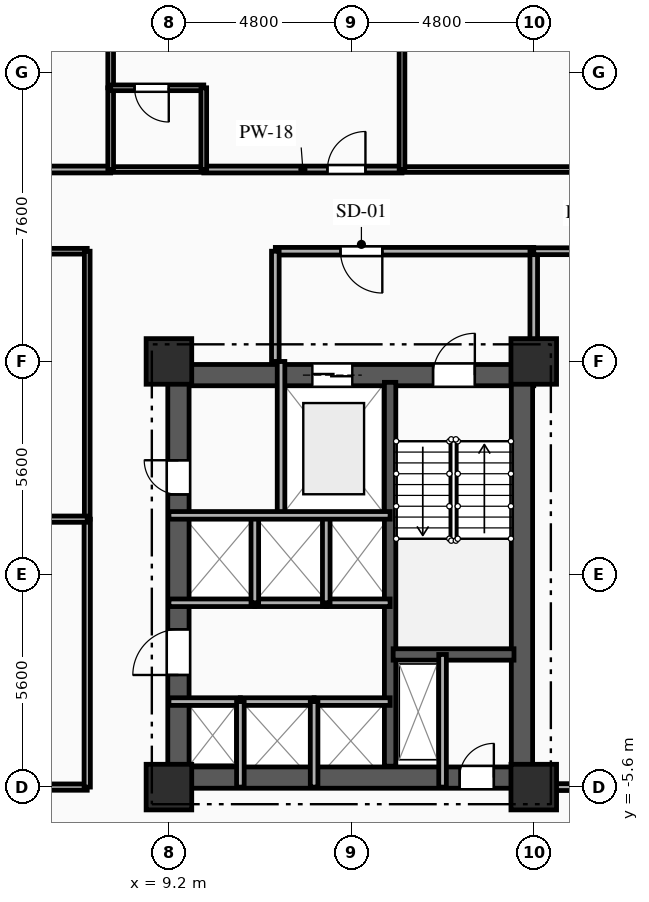
"""IFC4 building model, lengths in metres.
Left out: names, types, materials, properties, quantities, classifications, styles, units other than length and angle.
Written with IfcOpenShell. Run it as: python <this file> out.ifc"""

import sys

from ifc_helpers import new_model, si_unit, direction, frame, frame_2d, origin, origin_2d, place, context, subcontext, project, spatial, rectangle, extrude, element, fill, save


model = new_model("IFC4")
c1 = context("Model", 3, precision=1e-05, world=origin(), true_north=direction((0.0, 1.0)))
c2 = subcontext(c1, "Body", "Model", "MODEL_VIEW")
j1 = project(units=[si_unit("LENGTHUNIT", "METRE"), si_unit("PLANEANGLEUNIT", "RADIAN")], contexts=[c1])
p1 = place(None, origin())
s1 = spatial("IfcSite", under=j1, at=p1, CompositionType="ELEMENT")
p2 = place(p1, origin())
s2 = spatial("IfcBuilding", under=s1, at=p2, CompositionType="ELEMENT")
p3 = place(p2, frame((0.0, 0.0, 43.75)))
s3 = spatial("IfcBuildingStorey", under=s2, at=p3, CompositionType="ELEMENT", Elevation=43.75)
for number, where, z_axis, x_axis in (
    (1, (9.2, -5.6, 0.0), (0.0, 0.0, 1.0), (1.0, 0.0, 0.0)),
    (2, (9.2, 5.6, 0.0), (0.0, 0.0, 1.0), (1.0, 0.0, 0.0)),
    (3, (18.8, -5.6, 0.0), (0.0, 0.0, 1.0), (1.0, 0.0, 0.0)),
    (4, (18.8, 5.6, 0.0), (0.0, 0.0, 1.0), (1.0, 0.0, 0.0)),
):
    element("IfcColumn", number, at=place(p3, frame(where, z_axis=z_axis, x_axis=x_axis)), inside=s3, PredefinedType="COLUMN", context=c2, shape_type="SweptSolid", body=[
        extrude(rectangle(XDim=1.2, YDim=1.2, at=origin_2d()), origin(), (0.0, 0.0, 1.0), 3.35),
    ])
p4 = place(p3, frame((9.2, 5.24, 0.0), z_axis=(0.0, 0.0, 1.0), x_axis=(1.0, 0.0, 0.0)))
e5 = element("IfcWall", 5, at=p4, inside=s3, PredefinedType="SHEAR", context=c2, shape_type="SweptSolid", body=[
    extrude(rectangle(XDim=9.6, YDim=0.56, at=frame_2d((4.8, 0.0))), origin(), (0.0, 0.0, 1.0), 3.035),
])
p5 = place(p4, frame((6.95, 0.0, 0.0)))
e6 = element("IfcOpeningElement", 6, at=p5, cuts=e5, PredefinedType="OPENING", context=c2, shape_type="SweptSolid", body=[
    extrude(rectangle(XDim=1.1, YDim=2.15, at=frame_2d((0.55, 1.075))), frame((0.0, 0.29, 0.0), z_axis=(0.0, -1.0, 0.0), x_axis=(1.0, 0.0, 0.0)), (0.0, 0.0, 1.0), 0.58),
])
p6 = place(p4, frame((3.775, 0.0, 0.0)))
e7 = element("IfcOpeningElement", 7, at=p6, cuts=e5, PredefinedType="OPENING", context=c2, shape_type="SweptSolid", body=[
    extrude(rectangle(XDim=1.05, YDim=2.1, at=frame_2d((0.525, 1.05))), frame((0.0, 0.29, 0.0), z_axis=(0.0, -1.0, 0.0), x_axis=(1.0, 0.0, 0.0)), (0.0, 0.0, 1.0), 0.58),
])
p7 = place(p3, frame((9.2, -5.35, 0.0), z_axis=(0.0, 0.0, 1.0), x_axis=(1.0, 0.0, 0.0)))
e8 = element("IfcWall", 8, at=p7, inside=s3, PredefinedType="SHEAR", context=c2, shape_type="SweptSolid", body=[
    extrude(rectangle(XDim=9.6, YDim=0.56, at=frame_2d((4.8, 0.0))), origin(), (0.0, 0.0, 1.0), 3.035),
])
p8 = place(p7, frame((7.65, 0.0, 0.0)))
e9 = element("IfcOpeningElement", 9, at=p8, cuts=e8, PredefinedType="OPENING", context=c2, shape_type="SweptSolid", body=[
    extrude(rectangle(XDim=0.9, YDim=2.1, at=frame_2d((0.45, 1.05))), frame((0.0, 0.29, 0.0), z_axis=(0.0, -1.0, 0.0), x_axis=(1.0, 0.0, 0.0)), (0.0, 0.0, 1.0), 0.58),
])
p9 = place(p3, frame((9.45, -5.05, 0.0), z_axis=(0.0, 0.0, 1.0), x_axis=(0.0, 1.0, 0.0)))
e10 = element("IfcWall", 10, at=p9, inside=s3, PredefinedType="SHEAR", context=c2, shape_type="SweptSolid", body=[
    extrude(rectangle(XDim=10.1, YDim=0.56, at=frame_2d((5.05, 0.0))), origin(), (0.0, 0.0, 1.0), 3.035),
])
p10 = place(p9, frame((7.15, 0.0, 0.0)))
e11 = element("IfcOpeningElement", 11, at=p10, cuts=e10, PredefinedType="OPENING", context=c2, shape_type="SweptSolid", body=[
    extrude(rectangle(XDim=0.9, YDim=2.1, at=frame_2d((0.45, 1.05))), frame((0.0, 0.29, 0.0), z_axis=(0.0, -1.0, 0.0), x_axis=(1.0, 0.0, 0.0)), (0.0, 0.0, 1.0), 0.58),
])
p11 = place(p9, frame((2.4, 0.0, 0.0)))
e12 = element("IfcOpeningElement", 12, at=p11, cuts=e10, PredefinedType="OPENING", context=c2, shape_type="SweptSolid", body=[
    extrude(rectangle(XDim=1.2, YDim=2.15, at=frame_2d((0.6, 1.075))), frame((0.0, 0.29, 0.0), z_axis=(0.0, -1.0, 0.0), x_axis=(1.0, 0.0, 0.0)), (0.0, 0.0, 1.0), 0.58),
])
p12 = place(p3, frame((18.49, -5.05, 0.0), z_axis=(0.0, 0.0, 1.0), x_axis=(0.0, 1.0, 0.0)))
e13 = element("IfcWall", 13, at=p12, inside=s3, PredefinedType="SHEAR", context=c2, shape_type="SweptSolid", body=[
    extrude(rectangle(XDim=10.1, YDim=0.56, at=frame_2d((5.05, 0.0))), origin(), (0.0, 0.0, 1.0), 3.035),
])
p13 = place(p3, frame((15.02, -5.05, 0.0), z_axis=(0.0, 0.0, 1.0), x_axis=(0.0, 1.0, 0.0)))
e14 = element("IfcWall", 14, at=p13, inside=s3, PredefinedType="SHEAR", context=c2, shape_type="SweptSolid", body=[
    extrude(rectangle(XDim=10.1, YDim=0.3, at=frame_2d((5.05, 0.0))), origin(), (0.0, 0.0, 1.0), 3.035),
])
p14 = place(p3, frame((15.1, -2.11, 0.0), z_axis=(0.0, 0.0, 1.0), x_axis=(1.0, 0.0, 0.0)))
e15 = element("IfcWall", 15, at=p14, inside=s3, PredefinedType="SHEAR", context=c2, shape_type="SweptSolid", body=[
    extrude(rectangle(XDim=3.18, YDim=0.3, at=frame_2d((1.59, 0.0))), origin(), (0.0, 0.0, 1.0), 3.035),
])
p15 = place(p3, frame((16.4, -2.11, 0.0), z_axis=(0.0, 0.0, 1.0), x_axis=(0.0, -1.0, 0.0)))
e16 = element("IfcWall", 16, at=p15, inside=s3, PredefinedType="PARTITIONING", context=c2, shape_type="SweptSolid", body=[
    extrude(rectangle(XDim=3.49, YDim=0.2, at=frame_2d((1.745, 0.0))), origin(), (0.0, 0.0, 1.0), 3.035),
])
p16 = place(p3, frame((12.15, 5.6, 0.0), z_axis=(0.0, 0.0, 1.0), x_axis=(0.0, -1.0, 0.0)))
e17 = element("IfcWall", 17, at=p16, inside=s3, PredefinedType="PARTITIONING", context=c2, shape_type="SweptSolid", body=[
    extrude(rectangle(XDim=4.05, YDim=0.2, at=frame_2d((2.025, 0.0))), origin(), (0.0, 0.0, 1.0), 3.035),
])
p17 = place(p3, frame((18.8, 8.5, 0.0), z_axis=(0.0, 0.0, 1.0), x_axis=(-1.0, 0.0, 0.0)))
e18 = element("IfcWall", 18, at=p17, inside=s3, PredefinedType="PARTITIONING", context=c2, shape_type="SweptSolid", body=[
    extrude(rectangle(XDim=6.8, YDim=0.2, at=frame_2d((3.4, 0.0))), origin(), (0.0, 0.0, 1.0), 3.035),
])
p18 = place(p17, frame((3.985, 0.0, 0.0)))
e19 = element("IfcOpeningElement", 19, at=p18, cuts=e18, PredefinedType="OPENING", context=c2, shape_type="SweptSolid", body=[
    extrude(rectangle(XDim=1.1, YDim=2.15, at=frame_2d((0.55, 1.075))), frame((0.0, 0.11, 0.0), z_axis=(0.0, -1.0, 0.0), x_axis=(1.0, 0.0, 0.0)), (0.0, 0.0, 1.0), 0.22),
])
p19 = place(p3, frame((12.0, 8.5, 0.0), z_axis=(0.0, 0.0, 1.0), x_axis=(0.0, -1.0, 0.0)))
e20 = element("IfcWall", 20, at=p19, inside=s3, PredefinedType="PARTITIONING", context=c2, shape_type="SweptSolid", body=[
    extrude(rectangle(XDim=2.9, YDim=0.2, at=frame_2d((1.45, 0.0))), origin(), (0.0, 0.0, 1.0), 3.035),
])
p20 = place(p3, frame((18.8, 5.6, 0.0), z_axis=(0.0, 0.0, 1.0), x_axis=(0.0, 1.0, 0.0)))
e21 = element("IfcWall", 21, at=p20, inside=s3, PredefinedType="PARTITIONING", context=c2, shape_type="SweptSolid", body=[
    extrude(rectangle(XDim=2.9, YDim=0.2, at=frame_2d((1.45, 0.0))), origin(), (0.0, 0.0, 1.0), 2.52),
])
p21 = place(p3, frame((9.2, -3.35, 0.0), z_axis=(0.0, 0.0, 1.0), x_axis=(1.0, 0.0, 0.0)))
e22 = element("IfcWall", 22, at=p21, inside=s3, PredefinedType="PARTITIONING", context=c2, shape_type="SweptSolid", body=[
    extrude(rectangle(XDim=1.88, YDim=0.2, at=frame_2d((0.94, 0.0))), origin(), (0.0, 0.0, 1.0), 2.75),
])
p22 = place(p3, frame((11.08, -3.35, 0.0), z_axis=(0.0, 0.0, 1.0), x_axis=(1.0, 0.0, 0.0)))
e23 = element("IfcWall", 23, at=p22, inside=s3, PredefinedType="PARTITIONING", context=c2, shape_type="SweptSolid", body=[
    extrude(rectangle(XDim=1.94, YDim=0.2, at=frame_2d((0.97, 0.0))), origin(), (0.0, 0.0, 1.0), 3.035),
])
p23 = place(p3, frame((13.02, -3.35, 0.0), z_axis=(0.0, 0.0, 1.0), x_axis=(1.0, 0.0, 0.0)))
e24 = element("IfcWall", 24, at=p23, inside=s3, PredefinedType="PARTITIONING", context=c2, shape_type="SweptSolid", body=[
    extrude(rectangle(XDim=2.0, YDim=0.2, at=frame_2d((1.0, 0.0))), origin(), (0.0, 0.0, 1.0), 3.035),
])
p24 = place(p3, frame((11.46, -0.75, 0.0), z_axis=(0.0, 0.0, 1.0), x_axis=(-1.0, 0.0, 0.0)))
e25 = element("IfcWall", 25, at=p24, inside=s3, PredefinedType="PARTITIONING", context=c2, shape_type="SweptSolid", body=[
    extrude(rectangle(XDim=2.26, YDim=0.2, at=frame_2d((1.13, 0.0))), origin(), (0.0, 0.0, 1.0), 3.035),
])
p25 = place(p3, frame((13.34, -0.75, 0.0), z_axis=(0.0, 0.0, 1.0), x_axis=(-1.0, 0.0, 0.0)))
e26 = element("IfcWall", 26, at=p25, inside=s3, PredefinedType="PARTITIONING", context=c2, shape_type="SweptSolid", body=[
    extrude(rectangle(XDim=1.88, YDim=0.2, at=frame_2d((0.94, 0.0))), origin(), (0.0, 0.0, 1.0), 3.035),
])
p26 = place(p3, frame((15.02, -0.75, 0.0), z_axis=(0.0, 0.0, 1.0), x_axis=(-1.0, 0.0, 0.0)))
e27 = element("IfcWall", 27, at=p26, inside=s3, PredefinedType="PARTITIONING", context=c2, shape_type="SweptSolid", body=[
    extrude(rectangle(XDim=1.68, YDim=0.2, at=frame_2d((0.84, 0.0))), origin(), (0.0, 0.0, 1.0), 3.035),
])
for number, where, z_axis, x_axis in (
    (28, (11.08, -5.6, 0.0), (0.0, 0.0, 1.0), (0.0, 1.0, 0.0)),
    (29, (13.02, -5.6, 0.0), (0.0, 0.0, 1.0), (0.0, 1.0, 0.0)),
):
    element("IfcWall", number, at=place(p3, frame(where, z_axis=z_axis, x_axis=x_axis)), inside=s3, PredefinedType="PARTITIONING", context=c2, shape_type="SweptSolid", body=[
        extrude(rectangle(XDim=2.25, YDim=0.2, at=frame_2d((1.125, 0.0))), origin(), (0.0, 0.0, 1.0), 3.035),
    ])
for number, where, z_axis, x_axis in (
    (30, (11.46, -0.75, 0.0), (0.0, 0.0, 1.0), (0.0, 1.0, 0.0)),
    (31, (13.34, -0.75, 0.0), (0.0, 0.0, 1.0), (0.0, 1.0, 0.0)),
):
    element("IfcWall", number, at=place(p3, frame(where, z_axis=z_axis, x_axis=x_axis)), inside=s3, PredefinedType="PARTITIONING", context=c2, shape_type="SweptSolid", body=[
        extrude(rectangle(XDim=2.3, YDim=0.2, at=frame_2d((1.15, 0.0))), origin(), (0.0, 0.0, 1.0), 3.035),
    ])
p27 = place(p3, frame((21.45, 8.5, 0.0), z_axis=(0.0, 0.0, 1.0), x_axis=(-1.0, 0.0, 0.0)))
e32 = element("IfcWall", 32, at=p27, inside=s3, PredefinedType="PARTITIONING", context=c2, shape_type="SweptSolid", body=[
    extrude(rectangle(XDim=2.65, YDim=0.18, at=frame_2d((1.325, 0.0))), origin(), (0.0, 0.0, 1.0), 3.035),
])
p28 = place(p27, frame((0.641, 0.0, 0.0)))
e33 = element("IfcOpeningElement", 33, at=p28, cuts=e32, PredefinedType="OPENING", context=c2, shape_type="SweptSolid", body=[
    extrude(rectangle(XDim=1.0, YDim=2.15, at=frame_2d((0.5, 1.075))), frame((0.0, 0.1, 0.0), z_axis=(0.0, -1.0, 0.0), x_axis=(1.0, 0.0, 0.0)), (0.0, 0.0, 1.0), 0.2),
])
p29 = place(p3, frame((2.45, 10.65, 0.0), z_axis=(0.0, 0.0, 1.0), x_axis=(1.0, 0.0, 0.0)))
e34 = element("IfcWall", 34, at=p29, inside=s3, PredefinedType="PARTITIONING", context=c2, shape_type="SweptSolid", body=[
    extrude(rectangle(XDim=5.217, YDim=0.18, at=frame_2d((2.608, 0.0))), origin(), (0.0, 0.0, 1.0), 3.035),
])
p30 = place(p29, frame((0.962, 0.0, 0.0)))
e35 = element("IfcOpeningElement", 35, at=p30, cuts=e34, PredefinedType="OPENING", context=c2, shape_type="SweptSolid", body=[
    extrude(rectangle(XDim=1.0, YDim=2.15, at=frame_2d((0.5, 1.075))), frame((0.0, 0.1, 0.0), z_axis=(0.0, -1.0, 0.0), x_axis=(1.0, 0.0, 0.0)), (0.0, 0.0, 1.0), 0.2),
])
p31 = place(p3, frame((10.117, 10.65, 0.0), z_axis=(0.0, 0.0, 1.0), x_axis=(1.0, 0.0, 0.0)))
e36 = element("IfcWall", 36, at=p31, inside=s3, PredefinedType="PARTITIONING", context=c2, shape_type="SweptSolid", body=[
    extrude(rectangle(XDim=5.216, YDim=0.18, at=frame_2d((2.608, 0.0))), origin(), (0.0, 0.0, 1.0), 3.035),
])
p32 = place(p31, frame((3.254, 0.0, 0.0)))
e37 = element("IfcOpeningElement", 37, at=p32, cuts=e36, PredefinedType="OPENING", context=c2, shape_type="SweptSolid", body=[
    extrude(rectangle(XDim=1.0, YDim=2.15, at=frame_2d((0.5, 1.075))), frame((0.0, 0.1, 0.0), z_axis=(0.0, -1.0, 0.0), x_axis=(1.0, 0.0, 0.0)), (0.0, 0.0, 1.0), 0.2),
])
p33 = place(p3, frame((7.667, 10.65, 0.0), z_axis=(0.0, 0.0, 1.0), x_axis=(1.0, 0.0, 0.0)))
e38 = element("IfcWall", 38, at=p33, inside=s3, PredefinedType="PLUMBINGWALL", context=c2, shape_type="SweptSolid", body=[
    extrude(rectangle(XDim=2.45, YDim=0.15, at=frame_2d((1.225, 0.0))), origin(), (0.0, 0.0, 1.0), 3.035),
])
p34 = place(p3, frame((15.333, 10.65, 0.0), z_axis=(0.0, 0.0, 1.0), x_axis=(1.0, 0.0, 0.0)))
e39 = element("IfcWall", 39, at=p34, inside=s3, PredefinedType="PARTITIONING", context=c2, shape_type="SweptSolid", body=[
    extrude(rectangle(XDim=7.667, YDim=0.15, at=frame_2d((3.833, 0.0))), origin(), (0.0, 0.0, 1.0), 3.035),
])
p35 = place(p34, frame((5.355, 0.0, 0.0)))
e40 = element("IfcOpeningElement", 40, at=p35, cuts=e39, PredefinedType="OPENING", context=c2, shape_type="SweptSolid", body=[
    extrude(rectangle(XDim=1.05, YDim=2.15, at=frame_2d((0.525, 1.075))), frame((0.0, 0.085, 0.0), z_axis=(0.0, -1.0, 0.0), x_axis=(1.0, 0.0, 0.0)), (0.0, 0.0, 1.0), 0.17),
])
p36 = place(p3, frame((7.05, 8.5, 0.0), z_axis=(0.0, 0.0, 1.0), x_axis=(-1.0, 0.0, 0.0)))
e41 = element("IfcWall", 41, at=p36, inside=s3, PredefinedType="PARTITIONING", context=c2, shape_type="SweptSolid", body=[
    extrude(rectangle(XDim=7.05, YDim=0.15, at=frame_2d((3.525, 0.0))), origin(), (0.0, 0.0, 1.0), 3.035),
])
p37 = place(p3, frame((18.8, -5.6, 0.0), z_axis=(0.0, 0.0, 1.0), x_axis=(1.0, 0.0, 0.0)))
e42 = element("IfcWall", 42, at=p37, inside=s3, PredefinedType="PARTITIONING", context=c2, shape_type="SweptSolid", body=[
    extrude(rectangle(XDim=2.65, YDim=0.18, at=frame_2d((1.325, 0.0))), origin(), (0.0, 0.0, 1.0), 3.035),
])
p38 = place(p3, frame((0.0, -5.6, 0.0), z_axis=(0.0, 0.0, 1.0), x_axis=(1.0, 0.0, 0.0)))
e43 = element("IfcWall", 43, at=p38, inside=s3, PredefinedType="PARTITIONING", context=c2, shape_type="SweptSolid", body=[
    extrude(rectangle(XDim=7.05, YDim=0.165, at=frame_2d((3.525, 0.0))), origin(), (0.0, 0.0, 1.0), 2.52),
])
p39 = place(p3, frame((7.05, -5.6, 0.0), z_axis=(0.0, 0.0, 1.0), x_axis=(0.0, 1.0, 0.0)))
e44 = element("IfcWall", 44, at=p39, inside=s3, PredefinedType="PARTITIONING", context=c2, shape_type="SweptSolid", body=[
    extrude(rectangle(XDim=7.05, YDim=0.165, at=frame_2d((3.525, 0.0))), origin(), (0.0, 0.0, 1.0), 3.035),
])
p40 = place(p3, frame((7.05, 1.45, 0.0), z_axis=(0.0, 0.0, 1.0), x_axis=(0.0, 1.0, 0.0)))
e45 = element("IfcWall", 45, at=p40, inside=s3, PredefinedType="PARTITIONING", context=c2, shape_type="SweptSolid", body=[
    extrude(rectangle(XDim=7.05, YDim=0.15, at=frame_2d((3.525, 0.0))), origin(), (0.0, 0.0, 1.0), 3.035),
])
p41 = place(p3, frame((7.667, 19.4, 0.0), z_axis=(0.0, 0.0, 1.0), x_axis=(0.0, -1.0, 0.0)))
e46 = element("IfcWall", 46, at=p41, inside=s3, PredefinedType="PARTITIONING", context=c2, shape_type="SweptSolid", body=[
    extrude(rectangle(XDim=6.6, YDim=0.15, at=frame_2d((3.3, 0.0))), origin(), (0.0, 0.0, 1.0), 3.035),
])
p42 = place(p3, frame((7.667, 12.8, 0.0), z_axis=(0.0, 0.0, 1.0), x_axis=(0.0, -1.0, 0.0)))
e47 = element("IfcWall", 47, at=p42, inside=s3, PredefinedType="PLUMBINGWALL", context=c2, shape_type="SweptSolid", body=[
    extrude(rectangle(XDim=2.15, YDim=0.15, at=frame_2d((1.075, 0.0))), origin(), (0.0, 0.0, 1.0), 3.035),
])
p43 = place(p3, frame((10.117, 12.8, 0.0), z_axis=(0.0, 0.0, 1.0), x_axis=(-1.0, 0.0, 0.0)))
e48 = element("IfcWall", 48, at=p43, inside=s3, PredefinedType="PLUMBINGWALL", context=c2, shape_type="SweptSolid", body=[
    extrude(rectangle(XDim=2.45, YDim=0.15, at=frame_2d((1.225, 0.0))), origin(), (0.0, 0.0, 1.0), 3.035),
])
p44 = place(p43, frame((0.921, 0.0, 0.0)))
e49 = element("IfcOpeningElement", 49, at=p44, cuts=e48, PredefinedType="OPENING", context=c2, shape_type="SweptSolid", body=[
    extrude(rectangle(XDim=0.9, YDim=2.1, at=frame_2d((0.45, 1.05))), frame((0.0, 0.085, 0.0), z_axis=(0.0, -1.0, 0.0), x_axis=(1.0, 0.0, 0.0)), (0.0, 0.0, 1.0), 0.17),
])
p45 = place(p3, frame((10.117, 10.65, 0.0), z_axis=(0.0, 0.0, 1.0), x_axis=(0.0, 1.0, 0.0)))
e50 = element("IfcWall", 50, at=p45, inside=s3, PredefinedType="PLUMBINGWALL", context=c2, shape_type="SweptSolid", body=[
    extrude(rectangle(XDim=2.15, YDim=0.15, at=frame_2d((1.075, 0.0))), origin(), (0.0, 0.0, 1.0), 3.035),
])
p46 = place(p3, frame((15.333, 19.4, 0.0), z_axis=(0.0, 0.0, 1.0), x_axis=(0.0, -1.0, 0.0)))
e51 = element("IfcWall", 51, at=p46, inside=s3, PredefinedType="PARTITIONING", context=c2, shape_type="SweptSolid", body=[
    extrude(rectangle(XDim=8.75, YDim=0.15, at=frame_2d((4.375, 0.0))), origin(), (0.0, 0.0, 1.0), 3.035),
])
p47 = place(p3, frame((-7.05, 1.45, 0.0), z_axis=(0.0, 0.0, 1.0), x_axis=(1.0, 0.0, 0.0)))
e52 = element("IfcWall", 52, at=p47, inside=s3, PredefinedType="PARTITIONING", context=c2, shape_type="SweptSolid", body=[
    extrude(rectangle(XDim=14.1, YDim=0.165, at=frame_2d((7.05, 0.0))), origin(), (0.0, 0.0, 1.0), 3.035),
])
p48 = place(p3, frame((9.2, 1.55, 0.0), z_axis=(0.0, 0.0, 1.0), x_axis=(1.0, 0.0, 0.0)))
e53 = element("IfcWall", 53, at=p48, inside=s3, PredefinedType="PARTITIONING", context=c2, shape_type="SweptSolid", body=[
    extrude(rectangle(XDim=5.82, YDim=0.2, at=frame_2d((2.91, 0.0))), origin(), (0.0, 0.0, 1.0), 3.035),
])
p49 = place(p5, origin())
e54 = element("IfcDoor", 54, at=p49, inside=s3, OperationType="SINGLE_SWING_RIGHT", PredefinedType="DOOR", context=c2, shape_type="SweptSolid", body=[
    extrude(rectangle(XDim=1.1, YDim=2.15, at=frame_2d((0.55, 1.075))), frame((0.0, 0.025, 0.0), z_axis=(0.0, -1.0, 0.0), x_axis=(1.0, 0.0, 0.0)), (0.0, 0.0, 1.0), 0.05),
])
fill(e6, e54)
p50 = place(p6, origin())
e55 = element("IfcDoor", 55, at=p50, inside=s3, OperationType="DOUBLE_DOOR_SLIDING", PredefinedType="DOOR", context=c2, shape_type="SweptSolid", body=[
    extrude(rectangle(XDim=1.05, YDim=2.1, at=frame_2d((0.525, 1.05))), frame((0.0, 0.025, 0.0), z_axis=(0.0, -1.0, 0.0), x_axis=(1.0, 0.0, 0.0)), (0.0, 0.0, 1.0), 0.05),
])
fill(e7, e55)
p51 = place(p8, origin())
e56 = element("IfcDoor", 56, at=p51, inside=s3, OperationType="SINGLE_SWING_RIGHT", PredefinedType="DOOR", context=c2, shape_type="SweptSolid", body=[
    extrude(rectangle(XDim=0.9, YDim=2.1, at=frame_2d((0.45, 1.05))), frame((0.0, 0.025, 0.0), z_axis=(0.0, -1.0, 0.0), x_axis=(1.0, 0.0, 0.0)), (0.0, 0.0, 1.0), 0.05),
])
fill(e9, e56)
p52 = place(p18, origin())
e57 = element("IfcDoor", 57, at=p52, inside=s3, OperationType="SINGLE_SWING_LEFT", PredefinedType="DOOR", context=c2, shape_type="SweptSolid", body=[
    extrude(rectangle(XDim=1.1, YDim=2.15, at=frame_2d((0.55, 1.075))), frame((0.0, 0.025, 0.0), z_axis=(0.0, -1.0, 0.0), x_axis=(1.0, 0.0, 0.0)), (0.0, 0.0, 1.0), 0.05),
])
fill(e19, e57)
p53 = place(p10, origin())
e58 = element("IfcDoor", 58, at=p53, inside=s3, OperationType="SINGLE_SWING_RIGHT", PredefinedType="DOOR", context=c2, shape_type="SweptSolid", body=[
    extrude(rectangle(XDim=0.9, YDim=2.1, at=frame_2d((0.45, 1.05))), frame((0.0, 0.025, 0.0), z_axis=(0.0, -1.0, 0.0), x_axis=(1.0, 0.0, 0.0)), (0.0, 0.0, 1.0), 0.05),
])
fill(e11, e58)
p54 = place(p11, origin())
e59 = element("IfcDoor", 59, at=p54, inside=s3, OperationType="SINGLE_SWING_LEFT", PredefinedType="DOOR", context=c2, shape_type="SweptSolid", body=[
    extrude(rectangle(XDim=1.2, YDim=2.15, at=frame_2d((0.6, 1.075))), frame((0.0, 0.025, 0.0), z_axis=(0.0, -1.0, 0.0), x_axis=(1.0, 0.0, 0.0)), (0.0, 0.0, 1.0), 0.05),
])
fill(e12, e59)
p55 = place(p32, origin())
e60 = element("IfcDoor", 60, at=p55, inside=s3, OperationType="SINGLE_SWING_RIGHT", PredefinedType="DOOR", context=c2, shape_type="SweptSolid", body=[
    extrude(rectangle(XDim=1.0, YDim=2.15, at=frame_2d((0.5, 1.075))), frame((0.0, 0.025, 0.0), z_axis=(0.0, -1.0, 0.0), x_axis=(1.0, 0.0, 0.0)), (0.0, 0.0, 1.0), 0.05),
])
fill(e37, e60)
p56 = place(p44, origin())
e61 = element("IfcDoor", 61, at=p56, inside=s3, OperationType="SINGLE_SWING_LEFT", PredefinedType="DOOR", context=c2, shape_type="SweptSolid", body=[
    extrude(rectangle(XDim=0.9, YDim=2.1, at=frame_2d((0.45, 1.05))), frame((0.0, 0.025, 0.0), z_axis=(0.0, -1.0, 0.0), x_axis=(1.0, 0.0, 0.0)), (0.0, 0.0, 1.0), 0.05),
])
fill(e49, e61)
save(model, sys.argv[1])
